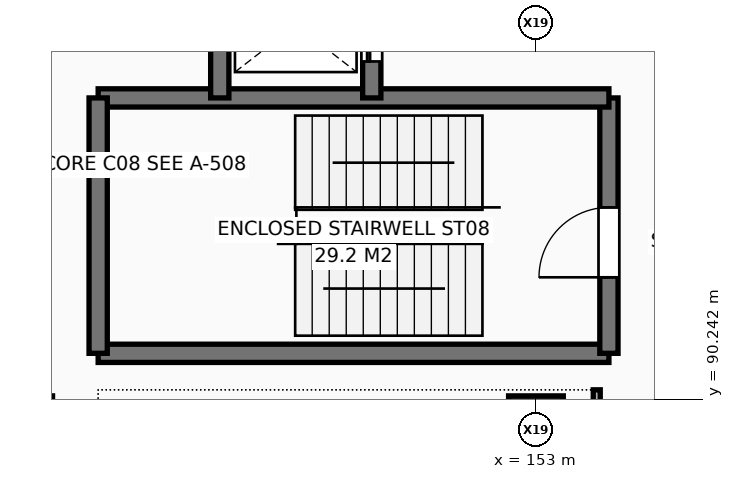
"""IFC4 building model, lengths in metres.
Left out: names, types, materials, properties, quantities, classifications, styles, units other than length and angle.
Written with IfcOpenShell. Run it as: python <this file> out.ifc"""

import sys

from ifc_helpers import new_model, si_unit, direction, frame, frame_2d, origin, origin_2d, place, context, subcontext, project, spatial, rectangle, extrude, element, fill, save


model = new_model("IFC4")
c1 = context("Model", 3, precision=1e-05, world=origin(), true_north=direction((0.0, 1.0)))
c2 = subcontext(c1, "Body", "Model", "MODEL_VIEW")
j1 = project(units=[si_unit("LENGTHUNIT", "METRE"), si_unit("PLANEANGLEUNIT", "RADIAN")], contexts=[c1])
p1 = place(None, origin())
s1 = spatial("IfcSite", under=j1, at=p1, CompositionType="ELEMENT")
p2 = place(p1, origin())
s2 = spatial("IfcBuilding", under=s1, at=p2, CompositionType="ELEMENT")
p3 = place(p2, frame((0.0, 0.0, -4.2)))
s3 = spatial("IfcBuildingStorey", under=s2, at=p3, CompositionType="ELEMENT", Elevation=-4.2)
p4 = place(p3, frame((153.0, 90.0, 0.0), z_axis=(0.0, 0.0, 1.0), x_axis=(1.0, 0.0, 0.0)))
e1 = element("IfcColumn", 1, at=p4, inside=s3, PredefinedType="COLUMN", context=c2, shape_type="SweptSolid", body=[
    extrude(rectangle(XDim=0.9, YDim=0.6, at=origin_2d()), origin(), (0.0, 0.0, 1.0), 4.2),
])
p5 = place(p3, frame((145.8, 91.0, 0.0), z_axis=(0.0, 0.0, 1.0), x_axis=(1.0, 0.0, 0.0)))
e2 = element("IfcWall", 2, at=p5, inside=s3, PredefinedType="SHEAR", context=c2, shape_type="SweptSolid", body=[
    extrude(rectangle(XDim=8.4, YDim=0.3, at=frame_2d((4.2, 0.0))), origin(), (0.0, 0.0, 1.0), 3.92),
])
p6 = place(p3, frame((154.2, 91.0, 0.0), z_axis=(0.0, 0.0, 1.0), x_axis=(0.0, 1.0, 0.0)))
e3 = element("IfcWall", 3, at=p6, inside=s3, PredefinedType="SHEAR", context=c2, shape_type="SweptSolid", body=[
    extrude(rectangle(XDim=4.2, YDim=0.3, at=frame_2d((2.1, 0.0))), origin(), (0.0, 0.0, 1.0), 3.92),
])
p7 = place(p6, frame((1.25, 0.0, 0.0)))
e4 = element("IfcOpeningElement", 4, at=p7, cuts=e3, PredefinedType="OPENING", context=c2, shape_type="SweptSolid", body=[
    extrude(rectangle(XDim=1.15, YDim=2.2, at=frame_2d((0.575, 1.1))), frame((0.0, 0.16, 0.0), z_axis=(0.0, -1.0, 0.0), x_axis=(1.0, 0.0, 0.0)), (0.0, 0.0, 1.0), 0.32),
])
p8 = place(p3, frame((154.2, 95.2, 0.0), z_axis=(0.0, 0.0, 1.0), x_axis=(-1.0, 0.0, 0.0)))
e5 = element("IfcWall", 5, at=p8, inside=s3, PredefinedType="SHEAR", context=c2, shape_type="SweptSolid", body=[
    extrude(rectangle(XDim=8.4, YDim=0.3, at=frame_2d((4.2, 0.0))), origin(), (0.0, 0.0, 1.0), 3.92),
])
p9 = place(p3, frame((145.8, 95.2, 0.0), z_axis=(0.0, 0.0, 1.0), x_axis=(0.0, -1.0, 0.0)))
e6 = element("IfcWall", 6, at=p9, inside=s3, PredefinedType="SHEAR", context=c2, shape_type="SweptSolid", body=[
    extrude(rectangle(XDim=4.2, YDim=0.3, at=frame_2d((2.1, 0.0))), origin(), (0.0, 0.0, 1.0), 3.92),
])
p10 = place(p3, frame((147.8, 97.6, 0.0), z_axis=(0.0, 0.0, 1.0), x_axis=(0.0, -1.0, 0.0)))
e7 = element("IfcWall", 7, at=p10, inside=s3, PredefinedType="SHEAR", context=c2, shape_type="SweptSolid", body=[
    extrude(rectangle(XDim=2.4, YDim=0.3, at=frame_2d((1.2, 0.0))), origin(), (0.0, 0.0, 1.0), 3.92),
])
p11 = place(p3, frame((150.3, 95.2, 0.0), z_axis=(0.0, 0.0, 1.0), x_axis=(0.0, 1.0, 0.0)))
e8 = element("IfcWall", 8, at=p11, inside=s3, PredefinedType="SHEAR", context=c2, shape_type="SweptSolid", body=[
    extrude(rectangle(XDim=2.4, YDim=0.3, at=frame_2d((1.2, 0.0))), origin(), (0.0, 0.0, 1.0), 3.92),
])
p12 = place(p11, frame((0.6, 0.0, 0.0)))
e9 = element("IfcOpeningElement", 9, at=p12, cuts=e8, PredefinedType="OPENING", context=c2, shape_type="SweptSolid", body=[
    extrude(rectangle(XDim=1.2, YDim=2.25, at=frame_2d((0.6, 1.125))), frame((0.0, 0.16, 0.0), z_axis=(0.0, -1.0, 0.0), x_axis=(1.0, 0.0, 0.0)), (0.0, 0.0, 1.0), 0.32),
])
p13 = place(p3, frame((154.0, 73.4, 0.0), z_axis=(0.0, 0.0, 1.0), x_axis=(0.0, 1.0, 0.0)))
e10 = element("IfcWall", 10, at=p13, inside=s3, PredefinedType="PARTITIONING", context=c2, shape_type="SweptSolid", body=[
    extrude(rectangle(XDim=17.0, YDim=0.115, at=frame_2d((8.5, 0.0))), origin(), (0.0, 0.0, 1.0), 3.86),
])
p14 = place(p13, frame((4.74, 0.0, 0.0)))
e11 = element("IfcOpeningElement", 11, at=p14, cuts=e10, PredefinedType="OPENING", context=c2, shape_type="SweptSolid", body=[
    extrude(rectangle(XDim=1.2, YDim=2.2, at=frame_2d((0.6, 1.1))), frame((0.0, 0.067, 0.0), z_axis=(0.0, -1.0, 0.0), x_axis=(1.0, 0.0, 0.0)), (0.0, 0.0, 1.0), 0.135),
])
p15 = place(p7, origin())
e12 = element("IfcDoor", 12, at=p15, inside=s3, OperationType="SINGLE_SWING_LEFT", PredefinedType="DOOR", context=c2, shape_type="SweptSolid", body=[
    extrude(rectangle(XDim=1.15, YDim=2.2, at=frame_2d((0.575, 1.1))), frame((0.0, 0.025, 0.0), z_axis=(0.0, -1.0, 0.0), x_axis=(1.0, 0.0, 0.0)), (0.0, 0.0, 1.0), 0.05),
])
fill(e4, e12)
p16 = place(p12, origin())
e13 = element("IfcDoor", 13, at=p16, inside=s3, OperationType="SLIDING_TO_LEFT", PredefinedType="DOOR", context=c2, shape_type="SweptSolid", body=[
    extrude(rectangle(XDim=1.2, YDim=2.25, at=frame_2d((0.6, 1.125))), frame((0.0, 0.025, 0.0), z_axis=(0.0, -1.0, 0.0), x_axis=(1.0, 0.0, 0.0)), (0.0, 0.0, 1.0), 0.05),
])
fill(e9, e13)
save(model, sys.argv[1])
